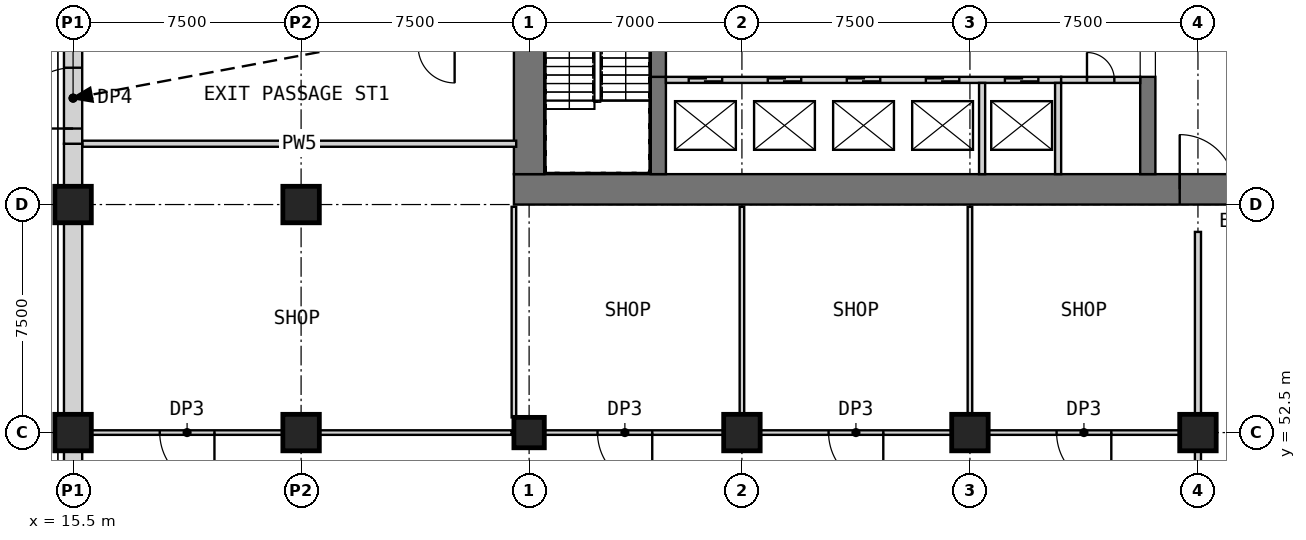
"""IFC4 building model, lengths in metres.
Left out: names, types, materials, properties, quantities, classifications, styles, units other than length and angle.
Written with IfcOpenShell. Run it as: python <this file> out.ifc"""

import sys

from ifc_helpers import new_model, si_unit, direction, frame, frame_2d, origin, origin_2d, place, context, subcontext, project, spatial, rectangle, extrude, element, fill, save


model = new_model("IFC4")
c1 = context("Model", 3, precision=1e-05, world=origin(), true_north=direction((0.0, 1.0)))
c2 = subcontext(c1, "Body", "Model", "MODEL_VIEW")
j1 = project(units=[si_unit("LENGTHUNIT", "METRE"), si_unit("PLANEANGLEUNIT", "RADIAN")], contexts=[c1])
p1 = place(None, origin())
s1 = spatial("IfcSite", under=j1, at=p1, CompositionType="ELEMENT")
p2 = place(p1, origin())
s2 = spatial("IfcBuilding", under=s1, at=p2, CompositionType="ELEMENT")
p3 = place(p2, origin())
s3 = spatial("IfcBuildingStorey", under=s2, at=p3, CompositionType="ELEMENT", Elevation=0.0)
p4 = place(p3, frame((30.5, 52.5, 0.0), z_axis=(0.0, 0.0, 1.0), x_axis=(1.0, 0.0, 0.0)))
e1 = element("IfcColumn", 1, at=p4, inside=s3, PredefinedType="COLUMN", context=c2, shape_type="SweptSolid", body=[
    extrude(rectangle(XDim=1.0, YDim=1.0, at=origin_2d()), origin(), (0.0, 0.0, 1.0), 8.0),
])
for number, where, z_axis, x_axis in (
    (2, (37.5, 52.5, 0.0), (0.0, 0.0, 1.0), (1.0, 0.0, 0.0)),
    (3, (45.0, 52.5, 0.0), (0.0, 0.0, 1.0), (1.0, 0.0, 0.0)),
    (4, (52.5, 52.5, 0.0), (0.0, 0.0, 1.0), (1.0, 0.0, 0.0)),
    (5, (15.5, 52.5, 0.0), (0.0, 0.0, 1.0), (1.0, 0.0, 0.0)),
    (6, (15.5, 60.0, 0.0), (0.0, 0.0, 1.0), (1.0, 0.0, 0.0)),
    (7, (23.0, 52.5, 0.0), (0.0, 0.0, 1.0), (1.0, 0.0, 0.0)),
    (8, (23.0, 60.0, 0.0), (0.0, 0.0, 1.0), (1.0, 0.0, 0.0)),
):
    element("IfcColumn", number, at=place(p3, frame(where, z_axis=z_axis, x_axis=x_axis)), inside=s3, PredefinedType="COLUMN", context=c2, shape_type="SweptSolid", body=[
        extrude(rectangle(XDim=1.2, YDim=1.2, at=origin_2d()), origin(), (0.0, 0.0, 1.0), 8.0),
    ])
p5 = place(p3, frame((30.0, 60.5, 0.0), z_axis=(0.0, 0.0, 1.0), x_axis=(1.0, 0.0, 0.0)))
e9 = element("IfcWall", 9, at=p5, inside=s3, PredefinedType="SHEAR", context=c2, shape_type="SweptSolid", body=[
    extrude(rectangle(XDim=30.0, YDim=1.0, at=frame_2d((15.0, 0.0))), origin(), (0.0, 0.0, 1.0), 8.0),
])
p6 = place(p5, frame((21.9, 0.0, 0.0)))
e10 = element("IfcOpeningElement", 10, at=p6, cuts=e9, PredefinedType="OPENING", context=c2, shape_type="SweptSolid", body=[
    extrude(rectangle(XDim=1.8, YDim=2.1, at=frame_2d((0.9, 1.05))), frame((0.0, 0.51, 0.0), z_axis=(0.0, -1.0, 0.0), x_axis=(1.0, 0.0, 0.0)), (0.0, 0.0, 1.0), 1.02),
])
p7 = place(p5, frame((26.5, 0.0, 0.0)))
e11 = element("IfcOpeningElement", 11, at=p7, cuts=e9, PredefinedType="OPENING", context=c2, shape_type="SweptSolid", body=[
    extrude(rectangle(XDim=1.2, YDim=2.1, at=frame_2d((0.6, 1.05))), frame((0.0, 0.51, 0.0), z_axis=(0.0, -1.0, 0.0), x_axis=(1.0, 0.0, 0.0)), (0.0, 0.0, 1.0), 1.02),
])
p8 = place(p3, frame((30.5, 61.0, 0.0), z_axis=(0.0, 0.0, 1.0), x_axis=(0.0, 1.0, 0.0)))
e12 = element("IfcWall", 12, at=p8, inside=s3, PredefinedType="SHEAR", context=c2, shape_type="SweptSolid", body=[
    extrude(rectangle(XDim=20.5, YDim=1.0, at=frame_2d((10.25, 0.0))), origin(), (0.0, 0.0, 1.0), 8.0),
])
p9 = place(p8, frame((5.9, 0.0, 0.0)))
e13 = element("IfcOpeningElement", 13, at=p9, cuts=e12, PredefinedType="OPENING", context=c2, shape_type="SweptSolid", body=[
    extrude(rectangle(XDim=1.2, YDim=2.1, at=frame_2d((0.6, 1.05))), frame((0.0, 0.51, 0.0), z_axis=(0.0, -1.0, 0.0), x_axis=(1.0, 0.0, 0.0)), (0.0, 0.0, 1.0), 1.02),
])
p10 = place(p8, frame((13.6, 0.0, 0.0)))
e14 = element("IfcOpeningElement", 14, at=p10, cuts=e12, PredefinedType="OPENING", context=c2, shape_type="SweptSolid", body=[
    extrude(rectangle(XDim=1.2, YDim=2.1, at=frame_2d((0.6, 1.05))), frame((0.0, 0.51, 0.0), z_axis=(0.0, -1.0, 0.0), x_axis=(1.0, 0.0, 0.0)), (0.0, 0.0, 1.0), 1.02),
])
for number, where, z_axis, x_axis in (
    (15, (34.75, 61.0, 0.0), (0.0, 0.0, 1.0), (0.0, 1.0, 0.0)),
    (16, (50.85, 61.0, 0.0), (0.0, 0.0, 1.0), (0.0, 1.0, 0.0)),
):
    element("IfcWall", number, at=place(p3, frame(where, z_axis=z_axis, x_axis=x_axis)), inside=s3, PredefinedType="SHEAR", context=c2, shape_type="SweptSolid", body=[
        extrude(rectangle(XDim=3.2, YDim=0.5, at=frame_2d((1.6, 0.0))), origin(), (0.0, 0.0, 1.0), 8.0),
    ])
p11 = place(p3, frame((35.0, 64.1, 0.0), z_axis=(0.0, 0.0, 1.0), x_axis=(1.0, 0.0, 0.0)))
e17 = element("IfcWall", 17, at=p11, inside=s3, PredefinedType="SOLIDWALL", context=c2, shape_type="SweptSolid", body=[
    extrude(rectangle(XDim=13.0, YDim=0.2, at=frame_2d((6.5, 0.0))), origin(), (0.0, 0.0, 1.0), 8.0),
])
p12 = place(p11, frame((0.75, 0.0, 0.0)))
e18 = element("IfcOpeningElement", 18, at=p12, cuts=e17, PredefinedType="OPENING", context=c2, shape_type="SweptSolid", body=[
    extrude(rectangle(XDim=1.1, YDim=2.1, at=frame_2d((0.55, 1.05))), frame((0.0, 0.11, 0.0), z_axis=(0.0, -1.0, 0.0), x_axis=(1.0, 0.0, 0.0)), (0.0, 0.0, 1.0), 0.22),
])
p13 = place(p11, frame((3.35, 0.0, 0.0)))
e19 = element("IfcOpeningElement", 19, at=p13, cuts=e17, PredefinedType="OPENING", context=c2, shape_type="SweptSolid", body=[
    extrude(rectangle(XDim=1.1, YDim=2.1, at=frame_2d((0.55, 1.05))), frame((0.0, 0.11, 0.0), z_axis=(0.0, -1.0, 0.0), x_axis=(1.0, 0.0, 0.0)), (0.0, 0.0, 1.0), 0.22),
])
p14 = place(p11, frame((5.95, 0.0, 0.0)))
e20 = element("IfcOpeningElement", 20, at=p14, cuts=e17, PredefinedType="OPENING", context=c2, shape_type="SweptSolid", body=[
    extrude(rectangle(XDim=1.1, YDim=2.1, at=frame_2d((0.55, 1.05))), frame((0.0, 0.11, 0.0), z_axis=(0.0, -1.0, 0.0), x_axis=(1.0, 0.0, 0.0)), (0.0, 0.0, 1.0), 0.22),
])
p15 = place(p11, frame((8.55, 0.0, 0.0)))
e21 = element("IfcOpeningElement", 21, at=p15, cuts=e17, PredefinedType="OPENING", context=c2, shape_type="SweptSolid", body=[
    extrude(rectangle(XDim=1.1, YDim=2.1, at=frame_2d((0.55, 1.05))), frame((0.0, 0.11, 0.0), z_axis=(0.0, -1.0, 0.0), x_axis=(1.0, 0.0, 0.0)), (0.0, 0.0, 1.0), 0.22),
])
p16 = place(p11, frame((11.15, 0.0, 0.0)))
e22 = element("IfcOpeningElement", 22, at=p16, cuts=e17, PredefinedType="OPENING", context=c2, shape_type="SweptSolid", body=[
    extrude(rectangle(XDim=1.1, YDim=2.1, at=frame_2d((0.55, 1.05))), frame((0.0, 0.11, 0.0), z_axis=(0.0, -1.0, 0.0), x_axis=(1.0, 0.0, 0.0)), (0.0, 0.0, 1.0), 0.22),
])
for number, where, z_axis, x_axis in (
    (23, (45.4, 61.0, 0.0), (0.0, 0.0, 1.0), (0.0, 1.0, 0.0)),
    (24, (47.9, 61.0, 0.0), (0.0, 0.0, 1.0), (0.0, 1.0, 0.0)),
):
    element("IfcWall", number, at=place(p3, frame(where, z_axis=z_axis, x_axis=x_axis)), inside=s3, PredefinedType="SOLIDWALL", context=c2, shape_type="SweptSolid", body=[
        extrude(rectangle(XDim=3.0, YDim=0.2, at=frame_2d((1.5, 0.0))), origin(), (0.0, 0.0, 1.0), 8.0),
    ])
p17 = place(p3, frame((48.0, 64.1, 0.0), z_axis=(0.0, 0.0, 1.0), x_axis=(1.0, 0.0, 0.0)))
e25 = element("IfcWall", 25, at=p17, inside=s3, PredefinedType="PARTITIONING", context=c2, shape_type="SweptSolid", body=[
    extrude(rectangle(XDim=2.6, YDim=0.2, at=frame_2d((1.3, 0.0))), origin(), (0.0, 0.0, 1.0), 7.7),
])
p18 = place(p17, frame((0.85, 0.0, 0.0)))
e26 = element("IfcOpeningElement", 26, at=p18, cuts=e25, PredefinedType="OPENING", context=c2, shape_type="SweptSolid", body=[
    extrude(rectangle(XDim=0.9, YDim=2.1, at=frame_2d((0.45, 1.05))), frame((0.0, 0.11, 0.0), z_axis=(0.0, -1.0, 0.0), x_axis=(1.0, 0.0, 0.0)), (0.0, 0.0, 1.0), 0.22),
])
p19 = place(p3, frame((34.75, 64.2, 0.0), z_axis=(0.0, 0.0, 1.0), x_axis=(0.0, 1.0, 0.0)))
e27 = element("IfcWall", 27, at=p19, inside=s3, PredefinedType="SOLIDWALL", context=c2, shape_type="SweptSolid", body=[
    extrude(rectangle(XDim=3.85, YDim=0.5, at=frame_2d((1.925, 0.0))), origin(), (0.0, 0.0, 1.0), 6.8),
])
p20 = place(p19, frame((2.3, 0.0, 0.0)))
e28 = element("IfcOpeningElement", 28, at=p20, cuts=e27, PredefinedType="OPENING", context=c2, shape_type="SweptSolid", body=[
    extrude(rectangle(XDim=1.2, YDim=2.1, at=frame_2d((0.6, 1.05))), frame((0.0, 0.26, 0.0), z_axis=(0.0, -1.0, 0.0), x_axis=(1.0, 0.0, 0.0)), (0.0, 0.0, 1.0), 0.52),
])
p21 = place(p3, frame((22.4, 52.5, 0.0), z_axis=(0.0, 0.0, 1.0), x_axis=(-1.0, 0.0, 0.0)))
e29 = element("IfcWall", 29, at=p21, inside=s3, PredefinedType="PARTITIONING", context=c2, shape_type="SweptSolid", body=[
    extrude(rectangle(XDim=6.3, YDim=0.15, at=frame_2d((3.15, 0.0))), origin(), (0.0, 0.0, 1.0), 7.7),
])
p22 = place(p21, frame((2.25, 0.0, 0.0)))
e30 = element("IfcOpeningElement", 30, at=p22, cuts=e29, PredefinedType="OPENING", context=c2, shape_type="SweptSolid", body=[
    extrude(rectangle(XDim=1.8, YDim=2.4, at=frame_2d((0.9, 1.2))), frame((0.0, 0.085, 0.0), z_axis=(0.0, -1.0, 0.0), x_axis=(1.0, 0.0, 0.0)), (0.0, 0.0, 1.0), 0.17),
])
p23 = place(p3, frame((23.6, 52.5, 0.0), z_axis=(0.0, 0.0, 1.0), x_axis=(1.0, 0.0, 0.0)))
e31 = element("IfcWall", 31, at=p23, inside=s3, PredefinedType="PARTITIONING", context=c2, shape_type="SweptSolid", body=[
    extrude(rectangle(XDim=6.325, YDim=0.15, at=frame_2d((3.163, 0.0))), origin(), (0.0, 0.0, 1.0), 7.7),
])
p24 = place(p3, frame((36.9, 52.5, 0.0), z_axis=(0.0, 0.0, 1.0), x_axis=(-1.0, 0.0, 0.0)))
e32 = element("IfcWall", 32, at=p24, inside=s3, PredefinedType="PARTITIONING", context=c2, shape_type="SweptSolid", body=[
    extrude(rectangle(XDim=5.9, YDim=0.15, at=frame_2d((2.95, 0.0))), origin(), (0.0, 0.0, 1.0), 7.7),
])
p25 = place(p24, frame((2.35, 0.0, 0.0)))
e33 = element("IfcOpeningElement", 33, at=p25, cuts=e32, PredefinedType="OPENING", context=c2, shape_type="SweptSolid", body=[
    extrude(rectangle(XDim=1.8, YDim=2.4, at=frame_2d((0.9, 1.2))), frame((0.0, 0.085, 0.0), z_axis=(0.0, -1.0, 0.0), x_axis=(1.0, 0.0, 0.0)), (0.0, 0.0, 1.0), 0.17),
])
p26 = place(p3, frame((44.4, 52.5, 0.0), z_axis=(0.0, 0.0, 1.0), x_axis=(-1.0, 0.0, 0.0)))
e34 = element("IfcWall", 34, at=p26, inside=s3, PredefinedType="PARTITIONING", context=c2, shape_type="SweptSolid", body=[
    extrude(rectangle(XDim=6.3, YDim=0.15, at=frame_2d((3.15, 0.0))), origin(), (0.0, 0.0, 1.0), 7.7),
])
p27 = place(p26, frame((2.25, 0.0, 0.0)))
e35 = element("IfcOpeningElement", 35, at=p27, cuts=e34, PredefinedType="OPENING", context=c2, shape_type="SweptSolid", body=[
    extrude(rectangle(XDim=1.8, YDim=2.4, at=frame_2d((0.9, 1.2))), frame((0.0, 0.085, 0.0), z_axis=(0.0, -1.0, 0.0), x_axis=(1.0, 0.0, 0.0)), (0.0, 0.0, 1.0), 0.17),
])
p28 = place(p3, frame((51.9, 52.5, 0.0), z_axis=(0.0, 0.0, 1.0), x_axis=(-1.0, 0.0, 0.0)))
e36 = element("IfcWall", 36, at=p28, inside=s3, PredefinedType="PARTITIONING", context=c2, shape_type="SweptSolid", body=[
    extrude(rectangle(XDim=6.3, YDim=0.15, at=frame_2d((3.15, 0.0))), origin(), (0.0, 0.0, 1.0), 7.7),
])
p29 = place(p28, frame((2.25, 0.0, 0.0)))
e37 = element("IfcOpeningElement", 37, at=p29, cuts=e36, PredefinedType="OPENING", context=c2, shape_type="SweptSolid", body=[
    extrude(rectangle(XDim=1.8, YDim=2.4, at=frame_2d((0.9, 1.2))), frame((0.0, 0.085, 0.0), z_axis=(0.0, -1.0, 0.0), x_axis=(1.0, 0.0, 0.0)), (0.0, 0.0, 1.0), 0.17),
])
p30 = place(p3, frame((15.8, 62.0, 0.0), z_axis=(0.0, 0.0, 1.0), x_axis=(1.0, 0.0, 0.0)))
e38 = element("IfcWall", 38, at=p30, inside=s3, PredefinedType="PARTITIONING", context=c2, shape_type="SweptSolid", body=[
    extrude(rectangle(XDim=14.275, YDim=0.2, at=frame_2d((7.137, 0.0))), origin(), (0.0, 0.0, 1.0), 7.7),
])
p31 = place(p3, frame((15.5, 50.5, 0.0), z_axis=(0.0, 0.0, 1.0), x_axis=(0.0, 1.0, 0.0)))
e39 = element("IfcWall", 39, at=p31, inside=s3, PredefinedType="PARTITIONING", context=c2, shape_type="SweptSolid", body=[
    extrude(rectangle(XDim=1.4, YDim=0.6, at=frame_2d((0.7, 0.0))), origin(), (0.0, 0.0, 1.0), 7.1),
])
p32 = place(p3, frame((15.5, 53.1, 0.0), z_axis=(0.0, 0.0, 1.0), x_axis=(0.0, 1.0, 0.0)))
e40 = element("IfcWall", 40, at=p32, inside=s3, PredefinedType="PARTITIONING", context=c2, shape_type="SweptSolid", body=[
    extrude(rectangle(XDim=6.3, YDim=0.6, at=frame_2d((3.15, 0.0))), origin(), (0.0, 0.0, 1.0), 7.1),
])
p33 = place(p3, frame((15.5, 60.6, 0.0), z_axis=(0.0, 0.0, 1.0), x_axis=(0.0, 1.0, 0.0)))
e41 = element("IfcWall", 41, at=p33, inside=s3, PredefinedType="PARTITIONING", context=c2, shape_type="SweptSolid", body=[
    extrude(rectangle(XDim=1.4, YDim=0.6, at=frame_2d((0.7, 0.0))), origin(), (0.0, 0.0, 1.0), 7.1),
])
p34 = place(p3, frame((15.5, 62.0, 0.0), z_axis=(0.0, 0.0, 1.0), x_axis=(0.0, 1.0, 0.0)))
e42 = element("IfcWall", 42, at=p34, inside=s3, PredefinedType="PARTITIONING", context=c2, shape_type="SweptSolid", body=[
    extrude(rectangle(XDim=3.2, YDim=0.6, at=frame_2d((1.6, 0.0))), origin(), (0.0, 0.0, 1.0), 7.1),
])
p35 = place(p34, frame((0.5, 0.0, 0.0)))
e43 = element("IfcOpeningElement", 43, at=p35, cuts=e42, PredefinedType="OPENING", context=c2, shape_type="SweptSolid", body=[
    extrude(rectangle(XDim=2.0, YDim=2.4, at=frame_2d((1.0, 1.2))), frame((0.0, 0.31, 0.0), z_axis=(0.0, -1.0, 0.0), x_axis=(1.0, 0.0, 0.0)), (0.0, 0.0, 1.0), 0.62),
])
p36 = place(p3, frame((52.5, 46.1, 0.0), z_axis=(0.0, 0.0, 1.0), x_axis=(0.0, 1.0, 0.0)))
e44 = element("IfcWall", 44, at=p36, inside=s3, PredefinedType="PARTITIONING", context=c2, shape_type="SweptSolid", body=[
    extrude(rectangle(XDim=5.8, YDim=0.2, at=frame_2d((2.9, 0.0))), origin(), (0.0, 0.0, 1.0), 7.7),
])
p37 = place(p3, frame((52.5, 53.1, 0.0), z_axis=(0.0, 0.0, 1.0), x_axis=(0.0, 1.0, 0.0)))
e45 = element("IfcWall", 45, at=p37, inside=s3, PredefinedType="PARTITIONING", context=c2, shape_type="SweptSolid", body=[
    extrude(rectangle(XDim=6.0, YDim=0.2, at=frame_2d((3.0, 0.0))), origin(), (0.0, 0.0, 1.0), 7.7),
])
p38 = place(p3, frame((30.0, 53.0, 0.0), z_axis=(0.0, 0.0, 1.0), x_axis=(0.0, 1.0, 0.0)))
e46 = element("IfcWall", 46, at=p38, inside=s3, PredefinedType="PARTITIONING", context=c2, shape_type="SweptSolid", body=[
    extrude(rectangle(XDim=6.925, YDim=0.15, at=frame_2d((3.462, 0.0))), origin(), (0.0, 0.0, 1.0), 7.7),
])
for number, where, z_axis, x_axis in (
    (47, (37.5, 53.1, 0.0), (0.0, 0.0, 1.0), (0.0, 1.0, 0.0)),
    (48, (45.0, 53.1, 0.0), (0.0, 0.0, 1.0), (0.0, 1.0, 0.0)),
):
    element("IfcWall", number, at=place(p3, frame(where, z_axis=z_axis, x_axis=x_axis)), inside=s3, PredefinedType="PARTITIONING", context=c2, shape_type="SweptSolid", body=[
        extrude(rectangle(XDim=6.825, YDim=0.15, at=frame_2d((3.413, 0.0))), origin(), (0.0, 0.0, 1.0), 7.7),
    ])
p39 = place(p12, origin())
e49 = element("IfcDoor", 49, at=p39, inside=s3, OperationType="DOUBLE_DOOR_SLIDING", PredefinedType="DOOR", context=c2, shape_type="SweptSolid", body=[
    extrude(rectangle(XDim=1.1, YDim=2.1, at=frame_2d((0.55, 1.05))), frame((0.0, 0.025, 0.0), z_axis=(0.0, -1.0, 0.0), x_axis=(1.0, 0.0, 0.0)), (0.0, 0.0, 1.0), 0.05),
])
fill(e18, e49)
p40 = place(p13, origin())
e50 = element("IfcDoor", 50, at=p40, inside=s3, OperationType="DOUBLE_DOOR_SLIDING", PredefinedType="DOOR", context=c2, shape_type="SweptSolid", body=[
    extrude(rectangle(XDim=1.1, YDim=2.1, at=frame_2d((0.55, 1.05))), frame((0.0, 0.025, 0.0), z_axis=(0.0, -1.0, 0.0), x_axis=(1.0, 0.0, 0.0)), (0.0, 0.0, 1.0), 0.05),
])
fill(e19, e50)
p41 = place(p14, origin())
e51 = element("IfcDoor", 51, at=p41, inside=s3, OperationType="DOUBLE_DOOR_SLIDING", PredefinedType="DOOR", context=c2, shape_type="SweptSolid", body=[
    extrude(rectangle(XDim=1.1, YDim=2.1, at=frame_2d((0.55, 1.05))), frame((0.0, 0.025, 0.0), z_axis=(0.0, -1.0, 0.0), x_axis=(1.0, 0.0, 0.0)), (0.0, 0.0, 1.0), 0.05),
])
fill(e20, e51)
p42 = place(p15, origin())
e52 = element("IfcDoor", 52, at=p42, inside=s3, OperationType="DOUBLE_DOOR_SLIDING", PredefinedType="DOOR", context=c2, shape_type="SweptSolid", body=[
    extrude(rectangle(XDim=1.1, YDim=2.1, at=frame_2d((0.55, 1.05))), frame((0.0, 0.025, 0.0), z_axis=(0.0, -1.0, 0.0), x_axis=(1.0, 0.0, 0.0)), (0.0, 0.0, 1.0), 0.05),
])
fill(e21, e52)
p43 = place(p16, origin())
e53 = element("IfcDoor", 53, at=p43, inside=s3, OperationType="DOUBLE_DOOR_SLIDING", PredefinedType="DOOR", context=c2, shape_type="SweptSolid", body=[
    extrude(rectangle(XDim=1.1, YDim=2.1, at=frame_2d((0.55, 1.05))), frame((0.0, 0.025, 0.0), z_axis=(0.0, -1.0, 0.0), x_axis=(1.0, 0.0, 0.0)), (0.0, 0.0, 1.0), 0.05),
])
fill(e22, e53)
p44 = place(p18, origin())
e54 = element("IfcDoor", 54, at=p44, inside=s3, OperationType="SINGLE_SWING_RIGHT", PredefinedType="DOOR", context=c2, shape_type="SweptSolid", body=[
    extrude(rectangle(XDim=0.9, YDim=2.1, at=frame_2d((0.45, 1.05))), frame((0.0, 0.025, 0.0), z_axis=(0.0, -1.0, 0.0), x_axis=(1.0, 0.0, 0.0)), (0.0, 0.0, 1.0), 0.05),
])
fill(e26, e54)
p45 = place(p6, origin())
e55 = element("IfcDoor", 55, at=p45, inside=s3, OperationType="DOUBLE_DOOR_SINGLE_SWING", PredefinedType="DOOR", context=c2, shape_type="SweptSolid", body=[
    extrude(rectangle(XDim=1.8, YDim=2.1, at=frame_2d((0.9, 1.05))), frame((0.0, 0.025, 0.0), z_axis=(0.0, -1.0, 0.0), x_axis=(1.0, 0.0, 0.0)), (0.0, 0.0, 1.0), 0.05),
])
fill(e10, e55)
p46 = place(p22, origin())
e56 = element("IfcDoor", 56, at=p46, inside=s3, OperationType="SINGLE_SWING_LEFT", PredefinedType="DOOR", context=c2, shape_type="SweptSolid", body=[
    extrude(rectangle(XDim=1.8, YDim=2.4, at=frame_2d((0.9, 1.2))), frame((0.0, 0.025, 0.0), z_axis=(0.0, -1.0, 0.0), x_axis=(1.0, 0.0, 0.0)), (0.0, 0.0, 1.0), 0.05),
])
fill(e30, e56)
p47 = place(p25, origin())
e57 = element("IfcDoor", 57, at=p47, inside=s3, OperationType="SINGLE_SWING_LEFT", PredefinedType="DOOR", context=c2, shape_type="SweptSolid", body=[
    extrude(rectangle(XDim=1.8, YDim=2.4, at=frame_2d((0.9, 1.2))), frame((0.0, 0.025, 0.0), z_axis=(0.0, -1.0, 0.0), x_axis=(1.0, 0.0, 0.0)), (0.0, 0.0, 1.0), 0.05),
])
fill(e33, e57)
p48 = place(p27, origin())
e58 = element("IfcDoor", 58, at=p48, inside=s3, OperationType="SINGLE_SWING_LEFT", PredefinedType="DOOR", context=c2, shape_type="SweptSolid", body=[
    extrude(rectangle(XDim=1.8, YDim=2.4, at=frame_2d((0.9, 1.2))), frame((0.0, 0.025, 0.0), z_axis=(0.0, -1.0, 0.0), x_axis=(1.0, 0.0, 0.0)), (0.0, 0.0, 1.0), 0.05),
])
fill(e35, e58)
p49 = place(p29, origin())
e59 = element("IfcDoor", 59, at=p49, inside=s3, OperationType="SINGLE_SWING_LEFT", PredefinedType="DOOR", context=c2, shape_type="SweptSolid", body=[
    extrude(rectangle(XDim=1.8, YDim=2.4, at=frame_2d((0.9, 1.2))), frame((0.0, 0.025, 0.0), z_axis=(0.0, -1.0, 0.0), x_axis=(1.0, 0.0, 0.0)), (0.0, 0.0, 1.0), 0.05),
])
fill(e37, e59)
p50 = place(p35, origin())
e60 = element("IfcDoor", 60, at=p50, inside=s3, OperationType="SINGLE_SWING_LEFT", PredefinedType="DOOR", context=c2, shape_type="SweptSolid", body=[
    extrude(rectangle(XDim=2.0, YDim=2.4, at=frame_2d((1.0, 1.2))), frame((0.0, 0.025, 0.0), z_axis=(0.0, -1.0, 0.0), x_axis=(1.0, 0.0, 0.0)), (0.0, 0.0, 1.0), 0.05),
])
fill(e43, e60)
save(model, sys.argv[1])
